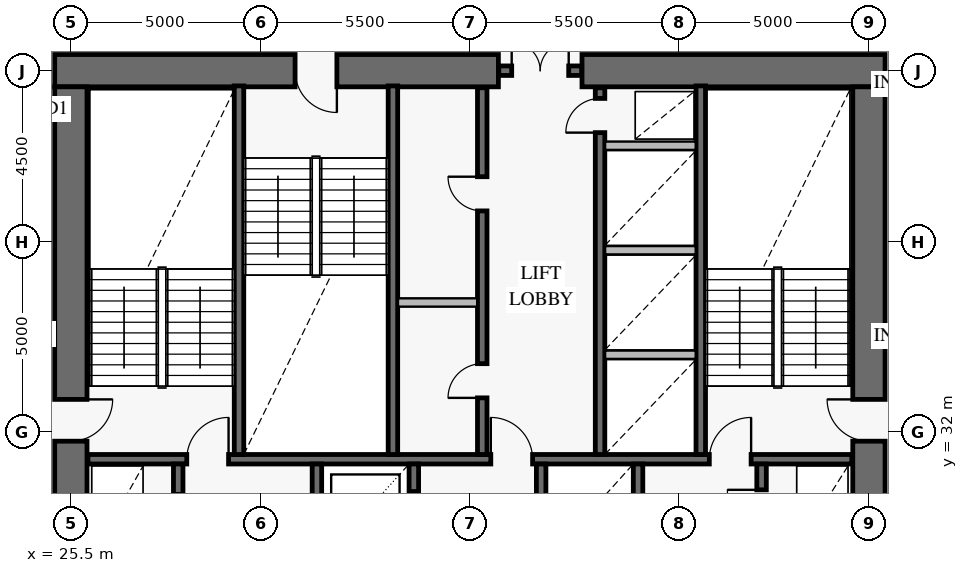
"""IFC4 building model, lengths in metres.
Left out: names, types, materials, properties, quantities, classifications, styles, units other than length and angle.
Written with IfcOpenShell. Run it as: python <this file> out.ifc"""

import sys

from ifc_helpers import new_model, si_unit, direction, frame, frame_2d, origin, place, context, subcontext, project, spatial, rectangle, extrude, element, fill, save


model = new_model("IFC4")
c1 = context("Model", 3, precision=1e-05, world=origin(), true_north=direction((0.0, 1.0)))
c2 = subcontext(c1, "Body", "Model", "MODEL_VIEW")
j1 = project(units=[si_unit("LENGTHUNIT", "METRE"), si_unit("PLANEANGLEUNIT", "RADIAN")], contexts=[c1])
p1 = place(None, origin())
s1 = spatial("IfcSite", under=j1, at=p1, CompositionType="ELEMENT")
p2 = place(p1, origin())
s2 = spatial("IfcBuilding", under=s1, at=p2, CompositionType="ELEMENT")
p3 = place(p2, frame((0.0, 0.0, 79.2)))
s3 = spatial("IfcBuildingStorey", under=s2, at=p3, CompositionType="ELEMENT", Elevation=79.2)
p4 = place(p3, frame((46.925, 41.5, 0.0), z_axis=(0.0, 0.0, 1.0), x_axis=(-1.0, 0.0, 0.0)))
e1 = element("IfcWall", 1, at=p4, inside=s3, PredefinedType="SHEAR", context=c2, shape_type="SweptSolid", body=[
    extrude(rectangle(XDim=7.975, YDim=0.85, at=frame_2d((3.988, 0.0))), origin(), (0.0, 0.0, 1.0), 4.2),
])
p5 = place(p3, frame((36.75, 41.5, 0.0), z_axis=(0.0, 0.0, 1.0), x_axis=(-1.0, 0.0, 0.0)))
e2 = element("IfcWall", 2, at=p5, inside=s3, PredefinedType="SHEAR", context=c2, shape_type="SweptSolid", body=[
    extrude(rectangle(XDim=11.675, YDim=0.85, at=frame_2d((5.837, 0.0))), origin(), (0.0, 0.0, 1.0), 4.2),
])
p6 = place(p5, frame((4.25, 0.0, 0.0)))
e3 = element("IfcOpeningElement", 3, at=p6, cuts=e2, PredefinedType="OPENING", context=c2, shape_type="SweptSolid", body=[
    extrude(rectangle(XDim=1.1, YDim=2.15, at=frame_2d((0.55, 1.075))), frame((0.0, 0.437, 0.0), z_axis=(0.0, -1.0, 0.0), x_axis=(1.0, 0.0, 0.0)), (0.0, 0.0, 1.0), 0.874),
])
p7 = place(p3, frame((25.5, 22.925, 0.0), z_axis=(0.0, 0.0, 1.0), x_axis=(0.0, 1.0, 0.0)))
e4 = element("IfcWall", 4, at=p7, inside=s3, PredefinedType="SHEAR", context=c2, shape_type="SweptSolid", body=[
    extrude(rectangle(XDim=18.15, YDim=0.85, at=frame_2d((9.075, 0.0))), origin(), (0.0, 0.0, 1.0), 4.2),
])
p8 = place(p7, frame((8.825, 0.0, 0.0)))
e5 = element("IfcOpeningElement", 5, at=p8, cuts=e4, PredefinedType="OPENING", context=c2, shape_type="SweptSolid", body=[
    extrude(rectangle(XDim=1.1, YDim=2.15, at=frame_2d((0.55, 1.075))), frame((0.0, 0.437, 0.0), z_axis=(0.0, -1.0, 0.0), x_axis=(1.0, 0.0, 0.0)), (0.0, 0.0, 1.0), 0.874),
])
p9 = place(p3, frame((46.5, 22.925, 0.0), z_axis=(0.0, 0.0, 1.0), x_axis=(0.0, 1.0, 0.0)))
e6 = element("IfcWall", 6, at=p9, inside=s3, PredefinedType="SHEAR", context=c2, shape_type="SweptSolid", body=[
    extrude(rectangle(XDim=18.15, YDim=0.85, at=frame_2d((9.075, 0.0))), origin(), (0.0, 0.0, 1.0), 4.2),
])
p10 = place(p9, frame((8.825, 0.0, 0.0)))
e7 = element("IfcOpeningElement", 7, at=p10, cuts=e6, PredefinedType="OPENING", context=c2, shape_type="SweptSolid", body=[
    extrude(rectangle(XDim=1.1, YDim=2.15, at=frame_2d((0.55, 1.075))), frame((0.0, 0.437, 0.0), z_axis=(0.0, -1.0, 0.0), x_axis=(1.0, 0.0, 0.0)), (0.0, 0.0, 1.0), 0.874),
])
p11 = place(p3, frame((36.76, 41.5, 0.0), z_axis=(0.0, 0.0, 1.0), x_axis=(1.0, 0.0, 0.0)))
e8 = element("IfcWall", 8, at=p11, inside=s3, PredefinedType="SOLIDWALL", context=c2, shape_type="SweptSolid", body=[
    extrude(rectangle(XDim=2.18, YDim=0.25, at=frame_2d((1.09, 0.0))), origin(), (0.0, 0.0, 1.0), 4.2),
])
p12 = place(p11, frame((0.34, 0.0, 0.0)))
e9 = element("IfcOpeningElement", 9, at=p12, cuts=e8, PredefinedType="OPENING", context=c2, shape_type="SweptSolid", body=[
    extrude(rectangle(XDim=1.5, YDim=2.15, at=frame_2d((0.75, 1.075))), frame((0.0, 0.137, 0.0), z_axis=(0.0, -1.0, 0.0), x_axis=(1.0, 0.0, 0.0)), (0.0, 0.0, 1.0), 0.274),
])
p13 = place(p3, frame((25.95, 31.275, 0.0), z_axis=(0.0, 0.0, 1.0), x_axis=(1.0, 0.0, 0.0)))
e10 = element("IfcWall", 10, at=p13, inside=s3, PredefinedType="SOLIDWALL", context=c2, shape_type="SweptSolid", body=[
    extrude(rectangle(XDim=20.1, YDim=0.25, at=frame_2d((10.05, 0.0))), origin(), (0.0, 0.0, 1.0), 4.2),
])
p14 = place(p13, frame((2.6, 0.0, 0.0)))
e11 = element("IfcOpeningElement", 11, at=p14, cuts=e10, PredefinedType="OPENING", context=c2, shape_type="SweptSolid", body=[
    extrude(rectangle(XDim=1.1, YDim=2.15, at=frame_2d((0.55, 1.075))), frame((0.0, 0.137, 0.0), z_axis=(0.0, -1.0, 0.0), x_axis=(1.0, 0.0, 0.0)), (0.0, 0.0, 1.0), 0.274),
])
p15 = place(p13, frame((10.6, 0.0, 0.0)))
e12 = element("IfcOpeningElement", 12, at=p15, cuts=e10, PredefinedType="OPENING", context=c2, shape_type="SweptSolid", body=[
    extrude(rectangle(XDim=1.1, YDim=2.15, at=frame_2d((0.55, 1.075))), frame((0.0, 0.137, 0.0), z_axis=(0.0, -1.0, 0.0), x_axis=(1.0, 0.0, 0.0)), (0.0, 0.0, 1.0), 0.274),
])
p16 = place(p13, frame((16.35, 0.0, 0.0)))
e13 = element("IfcOpeningElement", 13, at=p16, cuts=e10, PredefinedType="OPENING", context=c2, shape_type="SweptSolid", body=[
    extrude(rectangle(XDim=1.1, YDim=2.15, at=frame_2d((0.55, 1.075))), frame((0.0, 0.137, 0.0), z_axis=(0.0, -1.0, 0.0), x_axis=(1.0, 0.0, 0.0)), (0.0, 0.0, 1.0), 0.274),
])
for number, where, z_axis, x_axis in (
    (14, (29.925, 31.4, 0.0), (0.0, 0.0, 1.0), (0.0, 1.0, 0.0)),
    (15, (33.975, 31.4, 0.0), (0.0, 0.0, 1.0), (0.0, 1.0, 0.0)),
    (16, (42.075, 31.4, 0.0), (0.0, 0.0, 1.0), (0.0, 1.0, 0.0)),
):
    element("IfcWall", number, at=place(p3, frame(where, z_axis=z_axis, x_axis=x_axis)), inside=s3, PredefinedType="SOLIDWALL", context=c2, shape_type="SweptSolid", body=[
        extrude(rectangle(XDim=9.7, YDim=0.25, at=frame_2d((4.85, 0.0))), origin(), (0.0, 0.0, 1.0), 4.2),
    ])
p17 = place(p3, frame((36.325, 31.4, 0.0), z_axis=(0.0, 0.0, 1.0), x_axis=(0.0, 1.0, 0.0)))
e17 = element("IfcWall", 17, at=p17, inside=s3, PredefinedType="SOLIDWALL", context=c2, shape_type="SweptSolid", body=[
    extrude(rectangle(XDim=9.65, YDim=0.25, at=frame_2d((4.825, 0.0))), origin(), (0.0, 0.0, 1.0), 4.2),
])
p18 = place(p17, frame((1.49, 0.0, 0.0)))
e18 = element("IfcOpeningElement", 18, at=p18, cuts=e17, PredefinedType="OPENING", context=c2, shape_type="SweptSolid", body=[
    extrude(rectangle(XDim=0.9, YDim=2.1, at=frame_2d((0.45, 1.05))), frame((0.0, 0.137, 0.0), z_axis=(0.0, -1.0, 0.0), x_axis=(1.0, 0.0, 0.0)), (0.0, 0.0, 1.0), 0.274),
])
p19 = place(p17, frame((6.41, 0.0, 0.0)))
e19 = element("IfcOpeningElement", 19, at=p19, cuts=e17, PredefinedType="OPENING", context=c2, shape_type="SweptSolid", body=[
    extrude(rectangle(XDim=0.9, YDim=2.1, at=frame_2d((0.45, 1.05))), frame((0.0, 0.137, 0.0), z_axis=(0.0, -1.0, 0.0), x_axis=(1.0, 0.0, 0.0)), (0.0, 0.0, 1.0), 0.274),
])
p20 = place(p3, frame((39.425, 31.4, 0.0), z_axis=(0.0, 0.0, 1.0), x_axis=(0.0, 1.0, 0.0)))
e20 = element("IfcWall", 20, at=p20, inside=s3, PredefinedType="SOLIDWALL", context=c2, shape_type="SweptSolid", body=[
    extrude(rectangle(XDim=9.65, YDim=0.25, at=frame_2d((4.825, 0.0))), origin(), (0.0, 0.0, 1.0), 4.2),
])
p21 = place(p20, frame((8.47, 0.0, 0.0)))
e21 = element("IfcOpeningElement", 21, at=p21, cuts=e20, PredefinedType="OPENING", context=c2, shape_type="SweptSolid", body=[
    extrude(rectangle(XDim=0.9, YDim=2.1, at=frame_2d((0.45, 1.05))), frame((0.0, 0.137, 0.0), z_axis=(0.0, -1.0, 0.0), x_axis=(1.0, 0.0, 0.0)), (0.0, 0.0, 1.0), 0.274),
])
p22 = place(p3, frame((28.325, 22.95, 0.0), z_axis=(0.0, 0.0, 1.0), x_axis=(0.0, 1.0, 0.0)))
e22 = element("IfcWall", 22, at=p22, inside=s3, PredefinedType="SOLIDWALL", context=c2, shape_type="SweptSolid", body=[
    extrude(rectangle(XDim=8.2, YDim=0.25, at=frame_2d((4.1, 0.0))), origin(), (0.0, 0.0, 1.0), 4.2),
])
p23 = place(p22, frame((0.75, 0.0, 0.0)))
e23 = element("IfcOpeningElement", 23, at=p23, cuts=e22, PredefinedType="OPENING", context=c2, shape_type="SweptSolid", body=[
    extrude(rectangle(XDim=1.3, YDim=2.3, at=frame_2d((0.65, 1.15))), frame((0.0, 0.137, 0.0), z_axis=(0.0, -1.0, 0.0), x_axis=(1.0, 0.0, 0.0)), (0.0, 0.0, 1.0), 0.274),
])
p24 = place(p22, frame((3.78, 0.0, 0.0)))
e24 = element("IfcOpeningElement", 24, at=p24, cuts=e22, PredefinedType="OPENING", context=c2, shape_type="SweptSolid", body=[
    extrude(rectangle(XDim=0.9, YDim=2.1, at=frame_2d((0.45, 1.05))), frame((0.0, 0.137, 0.0), z_axis=(0.0, -1.0, 0.0), x_axis=(1.0, 0.0, 0.0)), (0.0, 0.0, 1.0), 0.274),
])
p25 = place(p22, frame((6.5, 0.0, 0.0)))
e25 = element("IfcOpeningElement", 25, at=p25, cuts=e22, PredefinedType="OPENING", context=c2, shape_type="SweptSolid", body=[
    extrude(rectangle(XDim=0.9, YDim=2.1, at=frame_2d((0.45, 1.05))), frame((0.0, 0.137, 0.0), z_axis=(0.0, -1.0, 0.0), x_axis=(1.0, 0.0, 0.0)), (0.0, 0.0, 1.0), 0.274),
])
p26 = place(p3, frame((31.975, 22.95, 0.0), z_axis=(0.0, 0.0, 1.0), x_axis=(0.0, 1.0, 0.0)))
e26 = element("IfcWall", 26, at=p26, inside=s3, PredefinedType="SOLIDWALL", context=c2, shape_type="SweptSolid", body=[
    extrude(rectangle(XDim=8.2, YDim=0.25, at=frame_2d((4.1, 0.0))), origin(), (0.0, 0.0, 1.0), 4.2),
])
p27 = place(p3, frame((34.525, 22.95, 0.0), z_axis=(0.0, 0.0, 1.0), x_axis=(0.0, 1.0, 0.0)))
e27 = element("IfcWall", 27, at=p27, inside=s3, PredefinedType="SOLIDWALL", context=c2, shape_type="SweptSolid", body=[
    extrude(rectangle(XDim=8.2, YDim=0.25, at=frame_2d((4.1, 0.0))), origin(), (0.0, 0.0, 1.0), 4.2),
])
p28 = place(p27, frame((0.775, 0.0, 0.0)))
e28 = element("IfcOpeningElement", 28, at=p28, cuts=e27, PredefinedType="OPENING", context=c2, shape_type="SweptSolid", body=[
    extrude(rectangle(XDim=1.1, YDim=2.2, at=frame_2d((0.55, 1.1))), frame((0.0, 0.137, 0.0), z_axis=(0.0, -1.0, 0.0), x_axis=(1.0, 0.0, 0.0)), (0.0, 0.0, 1.0), 0.274),
])
p29 = place(p27, frame((3.575, 0.0, 0.0)))
e29 = element("IfcOpeningElement", 29, at=p29, cuts=e27, PredefinedType="OPENING", context=c2, shape_type="SweptSolid", body=[
    extrude(rectangle(XDim=1.1, YDim=2.2, at=frame_2d((0.55, 1.1))), frame((0.0, 0.137, 0.0), z_axis=(0.0, -1.0, 0.0), x_axis=(1.0, 0.0, 0.0)), (0.0, 0.0, 1.0), 0.274),
])
p30 = place(p27, frame((6.375, 0.0, 0.0)))
e30 = element("IfcOpeningElement", 30, at=p30, cuts=e27, PredefinedType="OPENING", context=c2, shape_type="SweptSolid", body=[
    extrude(rectangle(XDim=1.1, YDim=2.2, at=frame_2d((0.55, 1.1))), frame((0.0, 0.137, 0.0), z_axis=(0.0, -1.0, 0.0), x_axis=(1.0, 0.0, 0.0)), (0.0, 0.0, 1.0), 0.274),
])
for number, where, z_axis, x_axis in (
    (31, (37.875, 22.95, 0.0), (0.0, 0.0, 1.0), (0.0, 1.0, 0.0)),
    (32, (40.425, 22.95, 0.0), (0.0, 0.0, 1.0), (0.0, 1.0, 0.0)),
):
    element("IfcWall", number, at=place(p3, frame(where, z_axis=z_axis, x_axis=x_axis)), inside=s3, PredefinedType="SOLIDWALL", context=c2, shape_type="SweptSolid", body=[
        extrude(rectangle(XDim=8.2, YDim=0.25, at=frame_2d((4.1, 0.0))), origin(), (0.0, 0.0, 1.0), 4.2),
    ])
p31 = place(p3, frame((43.675, 22.95, 0.0), z_axis=(0.0, 0.0, 1.0), x_axis=(0.0, 1.0, 0.0)))
e33 = element("IfcWall", 33, at=p31, inside=s3, PredefinedType="SOLIDWALL", context=c2, shape_type="SweptSolid", body=[
    extrude(rectangle(XDim=8.2, YDim=0.25, at=frame_2d((4.1, 0.0))), origin(), (0.0, 0.0, 1.0), 4.2),
])
p32 = place(p31, frame((0.75, 0.0, 0.0)))
e34 = element("IfcOpeningElement", 34, at=p32, cuts=e33, PredefinedType="OPENING", context=c2, shape_type="SweptSolid", body=[
    extrude(rectangle(XDim=1.3, YDim=2.3, at=frame_2d((0.65, 1.15))), frame((0.0, 0.137, 0.0), z_axis=(0.0, -1.0, 0.0), x_axis=(1.0, 0.0, 0.0)), (0.0, 0.0, 1.0), 0.274),
])
p33 = place(p31, frame((3.7, 0.0, 0.0)))
e35 = element("IfcOpeningElement", 35, at=p33, cuts=e33, PredefinedType="OPENING", context=c2, shape_type="SweptSolid", body=[
    extrude(rectangle(XDim=1.3, YDim=2.3, at=frame_2d((0.65, 1.15))), frame((0.0, 0.137, 0.0), z_axis=(0.0, -1.0, 0.0), x_axis=(1.0, 0.0, 0.0)), (0.0, 0.0, 1.0), 0.274),
])
p34 = place(p31, frame((6.62, 0.0, 0.0)))
e36 = element("IfcOpeningElement", 36, at=p34, cuts=e33, PredefinedType="OPENING", context=c2, shape_type="SweptSolid", body=[
    extrude(rectangle(XDim=0.9, YDim=2.1, at=frame_2d((0.45, 1.05))), frame((0.0, 0.137, 0.0), z_axis=(0.0, -1.0, 0.0), x_axis=(1.0, 0.0, 0.0)), (0.0, 0.0, 1.0), 0.274),
])
p35 = place(p3, frame((34.108, 35.4, 0.0), z_axis=(0.0, 0.0, 1.0), x_axis=(1.0, 0.0, 0.0)))
e37 = element("IfcWall", 37, at=p35, inside=s3, PredefinedType="PARTITIONING", context=c2, shape_type="SweptSolid", body=[
    extrude(rectangle(XDim=2.084, YDim=0.22, at=frame_2d((1.042, 0.0))), origin(), (0.0, 0.0, 1.0), 3.92),
])
for number, where, z_axis, x_axis in (
    (38, (39.558, 34.025, 0.0), (0.0, 0.0, 1.0), (1.0, 0.0, 0.0)),
    (39, (39.558, 36.775, 0.0), (0.0, 0.0, 1.0), (1.0, 0.0, 0.0)),
    (40, (39.558, 39.525, 0.0), (0.0, 0.0, 1.0), (1.0, 0.0, 0.0)),
):
    element("IfcWall", number, at=place(p3, frame(where, z_axis=z_axis, x_axis=x_axis)), inside=s3, PredefinedType="PARTITIONING", context=c2, shape_type="SweptSolid", body=[
        extrude(rectangle(XDim=2.384, YDim=0.22, at=frame_2d((1.192, 0.0))), origin(), (0.0, 0.0, 1.0), 3.92),
    ])
p36 = place(p8, frame((1.1, 0.0, 0.0), z_axis=(0.0, 0.0, 1.0), x_axis=(-1.0, 0.0, 0.0)))
e41 = element("IfcDoor", 41, at=p36, inside=s3, OperationType="SINGLE_SWING_LEFT", PredefinedType="USERDEFINED", context=c2, shape_type="SweptSolid", body=[
    extrude(rectangle(XDim=1.1, YDim=2.15, at=frame_2d((0.55, 1.075))), frame((0.0, 0.025, 0.0), z_axis=(0.0, -1.0, 0.0), x_axis=(1.0, 0.0, 0.0)), (0.0, 0.0, 1.0), 0.05),
])
fill(e5, e41)
p37 = place(p10, origin())
e42 = element("IfcDoor", 42, at=p37, inside=s3, OperationType="SINGLE_SWING_RIGHT", PredefinedType="USERDEFINED", context=c2, shape_type="SweptSolid", body=[
    extrude(rectangle(XDim=1.1, YDim=2.15, at=frame_2d((0.55, 1.075))), frame((0.0, 0.025, 0.0), z_axis=(0.0, -1.0, 0.0), x_axis=(1.0, 0.0, 0.0)), (0.0, 0.0, 1.0), 0.05),
])
fill(e7, e42)
p38 = place(p6, origin())
e43 = element("IfcDoor", 43, at=p38, inside=s3, OperationType="SINGLE_SWING_LEFT", PredefinedType="USERDEFINED", context=c2, shape_type="SweptSolid", body=[
    extrude(rectangle(XDim=1.1, YDim=2.15, at=frame_2d((0.55, 1.075))), frame((0.0, 0.025, 0.0), z_axis=(0.0, -1.0, 0.0), x_axis=(1.0, 0.0, 0.0)), (0.0, 0.0, 1.0), 0.05),
])
fill(e3, e43)
p39 = place(p12, origin())
e44 = element("IfcDoor", 44, at=p39, inside=s3, OperationType="DOUBLE_DOOR_SINGLE_SWING", PredefinedType="DOOR", context=c2, shape_type="SweptSolid", body=[
    extrude(rectangle(XDim=1.5, YDim=2.15, at=frame_2d((0.75, 1.075))), frame((0.0, 0.025, 0.0), z_axis=(0.0, -1.0, 0.0), x_axis=(1.0, 0.0, 0.0)), (0.0, 0.0, 1.0), 0.05),
])
fill(e9, e44)
p40 = place(p14, origin())
e45 = element("IfcDoor", 45, at=p40, inside=s3, OperationType="SINGLE_SWING_RIGHT", PredefinedType="USERDEFINED", context=c2, shape_type="SweptSolid", body=[
    extrude(rectangle(XDim=1.1, YDim=2.15, at=frame_2d((0.55, 1.075))), frame((0.0, 0.025, 0.0), z_axis=(0.0, -1.0, 0.0), x_axis=(1.0, 0.0, 0.0)), (0.0, 0.0, 1.0), 0.05),
])
fill(e11, e45)
p41 = place(p15, origin())
e46 = element("IfcDoor", 46, at=p41, inside=s3, OperationType="SINGLE_SWING_LEFT", PredefinedType="USERDEFINED", context=c2, shape_type="SweptSolid", body=[
    extrude(rectangle(XDim=1.1, YDim=2.15, at=frame_2d((0.55, 1.075))), frame((0.0, 0.025, 0.0), z_axis=(0.0, -1.0, 0.0), x_axis=(1.0, 0.0, 0.0)), (0.0, 0.0, 1.0), 0.05),
])
fill(e12, e46)
p42 = place(p16, origin())
e47 = element("IfcDoor", 47, at=p42, inside=s3, OperationType="SINGLE_SWING_RIGHT", PredefinedType="USERDEFINED", context=c2, shape_type="SweptSolid", body=[
    extrude(rectangle(XDim=1.1, YDim=2.15, at=frame_2d((0.55, 1.075))), frame((0.0, 0.025, 0.0), z_axis=(0.0, -1.0, 0.0), x_axis=(1.0, 0.0, 0.0)), (0.0, 0.0, 1.0), 0.05),
])
fill(e13, e47)
p43 = place(p18, origin())
e48 = element("IfcDoor", 48, at=p43, inside=s3, OperationType="SINGLE_SWING_LEFT", PredefinedType="DOOR", context=c2, shape_type="SweptSolid", body=[
    extrude(rectangle(XDim=0.9, YDim=2.1, at=frame_2d((0.45, 1.05))), frame((0.0, 0.025, 0.0), z_axis=(0.0, -1.0, 0.0), x_axis=(1.0, 0.0, 0.0)), (0.0, 0.0, 1.0), 0.05),
])
fill(e18, e48)
p44 = place(p19, origin())
e49 = element("IfcDoor", 49, at=p44, inside=s3, OperationType="SINGLE_SWING_RIGHT", PredefinedType="DOOR", context=c2, shape_type="SweptSolid", body=[
    extrude(rectangle(XDim=0.9, YDim=2.1, at=frame_2d((0.45, 1.05))), frame((0.0, 0.025, 0.0), z_axis=(0.0, -1.0, 0.0), x_axis=(1.0, 0.0, 0.0)), (0.0, 0.0, 1.0), 0.05),
])
fill(e19, e49)
p45 = place(p21, origin())
e50 = element("IfcDoor", 50, at=p45, inside=s3, OperationType="SINGLE_SWING_LEFT", PredefinedType="DOOR", context=c2, shape_type="SweptSolid", body=[
    extrude(rectangle(XDim=0.9, YDim=2.1, at=frame_2d((0.45, 1.05))), frame((0.0, 0.025, 0.0), z_axis=(0.0, -1.0, 0.0), x_axis=(1.0, 0.0, 0.0)), (0.0, 0.0, 1.0), 0.05),
])
fill(e21, e50)
p46 = place(p30, frame((1.1, 0.0, 0.0), z_axis=(0.0, 0.0, 1.0), x_axis=(-1.0, 0.0, 0.0)))
e51 = element("IfcDoor", 51, at=p46, inside=s3, OperationType="DOUBLE_DOOR_SLIDING", PredefinedType="DOOR", context=c2, shape_type="SweptSolid", body=[
    extrude(rectangle(XDim=1.1, YDim=2.2, at=frame_2d((0.55, 1.1))), frame((0.0, 0.025, 0.0), z_axis=(0.0, -1.0, 0.0), x_axis=(1.0, 0.0, 0.0)), (0.0, 0.0, 1.0), 0.05),
])
fill(e30, e51)
p47 = place(p34, origin())
e52 = element("IfcDoor", 52, at=p47, inside=s3, OperationType="SINGLE_SWING_RIGHT", PredefinedType="DOOR", context=c2, shape_type="SweptSolid", body=[
    extrude(rectangle(XDim=0.9, YDim=2.1, at=frame_2d((0.45, 1.05))), frame((0.0, 0.025, 0.0), z_axis=(0.0, -1.0, 0.0), x_axis=(1.0, 0.0, 0.0)), (0.0, 0.0, 1.0), 0.05),
])
fill(e36, e52)
save(model, sys.argv[1])
